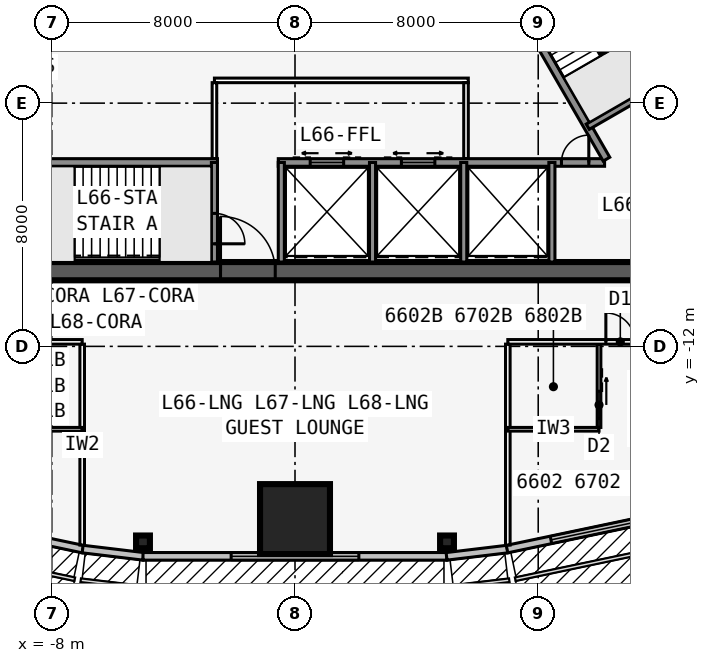
"""IFC4 building model, lengths in metres.
Left out: names, types, materials, properties, quantities, classifications, styles, units other than length and angle.
Written with IfcOpenShell. Run it as: python <this file> out.ifc"""

import sys

from ifc_helpers import new_model, si_unit, direction, frame, frame_2d, origin, origin_2d, place, context, subcontext, project, spatial, rectangle, i_section, extrude, element, fill, save


model = new_model("IFC4")
c1 = context("Model", 3, precision=1e-05, world=origin(), true_north=direction((0.0, 1.0)))
c2 = subcontext(c1, "Body", "Model", "MODEL_VIEW")
j1 = project(units=[si_unit("LENGTHUNIT", "METRE"), si_unit("PLANEANGLEUNIT", "RADIAN")], contexts=[c1])
p1 = place(None, origin())
s1 = spatial("IfcSite", under=j1, at=p1, CompositionType="ELEMENT")
p2 = place(p1, origin())
s2 = spatial("IfcBuilding", under=s1, at=p2, CompositionType="ELEMENT")
p3 = place(p2, frame((0.0, 0.0, 250.1)))
s3 = spatial("IfcBuildingStorey", under=s2, at=p3, CompositionType="ELEMENT", Elevation=250.1)
p4 = place(p3, frame((-16.5, -9.526, 0.0), z_axis=(0.0, 0.0, 1.0), x_axis=(1.0, 0.0, 0.0)))
e1 = element("IfcWall", 1, at=p4, inside=s3, PredefinedType="SHEAR", context=c2, shape_type="SweptSolid", body=[
    extrude(rectangle(XDim=33.0, YDim=0.6, at=frame_2d((16.5, 0.0))), origin(), (0.0, 0.0, 1.0), 3.6),
])
p5 = place(p4, frame((14.05, 0.0, 0.0)))
e2 = element("IfcOpeningElement", 2, at=p5, cuts=e1, PredefinedType="OPENING", context=c2, shape_type="SweptSolid", body=[
    extrude(rectangle(XDim=1.8, YDim=2.13, at=frame_2d((0.9, 1.065))), frame((0.0, 0.31, 0.0), z_axis=(0.0, -1.0, 0.0), x_axis=(1.0, 0.0, 0.0)), (0.0, 0.0, 1.0), 0.62),
])
p6 = place(p3, frame((-10.183, -5.951, 0.0), z_axis=(0.0, 0.0, 1.0), x_axis=(1.0, 0.0, 0.0)))
e3 = element("IfcWall", 3, at=p6, inside=s3, PredefinedType="SOLIDWALL", context=c2, shape_type="SweptSolid", body=[
    extrude(rectangle(XDim=7.633, YDim=0.25, at=frame_2d((3.816, 0.0))), origin(), (0.0, 0.0, 1.0), 3.435),
])
p7 = place(p3, frame((-0.55, -5.951, 0.0), z_axis=(0.0, 0.0, 1.0), x_axis=(1.0, 0.0, 0.0)))
e4 = element("IfcWall", 4, at=p7, inside=s3, PredefinedType="SOLIDWALL", context=c2, shape_type="SweptSolid", body=[
    extrude(rectangle(XDim=10.733, YDim=0.25, at=frame_2d((5.366, 0.0))), origin(), (0.0, 0.0, 1.0), 3.435),
])
p8 = place(p7, frame((9.314, 0.0, 0.0)))
e5 = element("IfcOpeningElement", 5, at=p8, cuts=e4, PredefinedType="OPENING", context=c2, shape_type="SweptSolid", body=[
    extrude(rectangle(XDim=0.9, YDim=2.13, at=frame_2d((0.45, 1.065))), frame((0.0, 0.135, 0.0), z_axis=(0.0, -1.0, 0.0), x_axis=(1.0, 0.0, 0.0)), (0.0, 0.0, 1.0), 0.27),
])
p9 = place(p7, frame((1.05, 0.0, 0.0)))
e6 = element("IfcOpeningElement", 6, at=p9, cuts=e4, PredefinedType="OPENING", context=c2, shape_type="SweptSolid", body=[
    extrude(rectangle(XDim=1.1, YDim=2.13, at=frame_2d((0.55, 1.065))), frame((0.0, 0.135, 0.0), z_axis=(0.0, -1.0, 0.0), x_axis=(1.0, 0.0, 0.0)), (0.0, 0.0, 1.0), 0.27),
])
p10 = place(p7, frame((4.05, 0.0, 0.0)))
e7 = element("IfcOpeningElement", 7, at=p10, cuts=e4, PredefinedType="OPENING", context=c2, shape_type="SweptSolid", body=[
    extrude(rectangle(XDim=1.1, YDim=2.13, at=frame_2d((0.55, 1.065))), frame((0.0, 0.135, 0.0), z_axis=(0.0, -1.0, 0.0), x_axis=(1.0, 0.0, 0.0)), (0.0, 0.0, 1.0), 0.27),
])
p11 = place(p3, frame((-2.65, -5.951, 0.0), z_axis=(0.0, 0.0, 1.0), x_axis=(0.0, -1.0, 0.0)))
e8 = element("IfcWall", 8, at=p11, inside=s3, PredefinedType="SOLIDWALL", context=c2, shape_type="SweptSolid", body=[
    extrude(rectangle(XDim=3.275, YDim=0.2, at=frame_2d((1.637, 0.0))), origin(), (0.0, 0.0, 1.0), 3.435),
])
p12 = place(p11, frame((1.675, 0.0, 0.0)))
e9 = element("IfcOpeningElement", 9, at=p12, cuts=e8, PredefinedType="OPENING", context=c2, shape_type="SweptSolid", body=[
    extrude(rectangle(XDim=1.0, YDim=2.13, at=frame_2d((0.5, 1.065))), frame((0.0, 0.11, 0.0), z_axis=(0.0, -1.0, 0.0), x_axis=(1.0, 0.0, 0.0)), (0.0, 0.0, 1.0), 0.22),
])
for number, where, z_axis, x_axis in (
    (10, (-0.45, -5.951, 0.0), (0.0, 0.0, 1.0), (0.0, -1.0, 0.0)),
    (11, (2.55, -5.951, 0.0), (0.0, 0.0, 1.0), (0.0, -1.0, 0.0)),
    (12, (5.55, -5.951, 0.0), (0.0, 0.0, 1.0), (0.0, -1.0, 0.0)),
    (13, (8.45, -5.951, 0.0), (0.0, 0.0, 1.0), (0.0, -1.0, 0.0)),
):
    element("IfcWall", number, at=place(p3, frame(where, z_axis=z_axis, x_axis=x_axis)), inside=s3, PredefinedType="SOLIDWALL", context=c2, shape_type="SweptSolid", body=[
        extrude(rectangle(XDim=3.275, YDim=0.2, at=frame_2d((1.637, 0.0))), origin(), (0.0, 0.0, 1.0), 3.435),
    ])
p13 = place(p3, frame((16.5, -9.526, 0.0), z_axis=(0.0, 0.0, 1.0), x_axis=(-0.499999749417, 0.866025548458, 0.0)))
e14 = element("IfcWall", 14, at=p13, inside=s3, PredefinedType="SHEAR", context=c2, shape_type="SweptSolid", body=[
    extrude(rectangle(XDim=33.0, YDim=0.6, at=frame_2d((16.5, 0.0))), origin(), (0.0, 0.0, 1.0), 3.6),
])
p14 = place(p13, frame((14.15, 0.0, 0.0)))
e15 = element("IfcOpeningElement", 15, at=p14, cuts=e14, PredefinedType="OPENING", context=c2, shape_type="SweptSolid", body=[
    extrude(rectangle(XDim=1.8, YDim=2.13, at=frame_2d((0.9, 1.065))), frame((0.0, 0.31, 0.0), z_axis=(0.0, -1.0, 0.0), x_axis=(1.0, 0.0, 0.0)), (0.0, 0.0, 1.0), 0.62),
])
p15 = place(p13, frame((12.6, 0.0, 0.0)))
e16 = element("IfcOpeningElement", 16, at=p15, cuts=e14, PredefinedType="OPENING", context=c2, shape_type="SweptSolid", body=[
    extrude(rectangle(XDim=1.0, YDim=2.13, at=frame_2d((0.5, 1.065))), frame((0.0, 0.31, 0.0), z_axis=(0.0, -1.0, 0.0), x_axis=(1.0, 0.0, 0.0)), (0.0, 0.0, 1.0), 0.62),
])
p16 = place(p3, frame((10.245, -5.843, 0.0), z_axis=(0.0, 0.0, 1.0), x_axis=(-0.499993009313, 0.866029439822, 0.0)))
e17 = element("IfcWall", 17, at=p16, inside=s3, PredefinedType="SOLIDWALL", context=c2, shape_type="SweptSolid", body=[
    extrude(rectangle(XDim=7.733, YDim=0.25, at=frame_2d((3.866, 0.0))), origin(), (0.0, 0.0, 1.0), 3.435),
])
p17 = place(p3, frame((9.629, -4.775, 0.0), z_axis=(0.0, 0.0, 1.0), x_axis=(0.865995643347, 0.500051543047, 0.0)))
e18 = element("IfcWall", 18, at=p17, inside=s3, PredefinedType="SOLIDWALL", context=c2, shape_type="SweptSolid", body=[
    extrude(rectangle(XDim=3.275, YDim=0.2, at=frame_2d((1.638, 0.0))), origin(), (0.0, 0.0, 1.0), 3.435),
])
p18 = place(p3, frame((0.0, 19.052, 0.0), z_axis=(0.0, 0.0, 1.0), x_axis=(-0.499999749417, -0.866025548458, 0.0)))
e19 = element("IfcWall", 19, at=p18, inside=s3, PredefinedType="SHEAR", context=c2, shape_type="SweptSolid", body=[
    extrude(rectangle(XDim=33.0, YDim=0.6, at=frame_2d((16.5, 0.0))), origin(), (0.0, 0.0, 1.0), 3.6),
])
p19 = place(p18, frame((14.15, 0.0, 0.0)))
e20 = element("IfcOpeningElement", 20, at=p19, cuts=e19, PredefinedType="OPENING", context=c2, shape_type="SweptSolid", body=[
    extrude(rectangle(XDim=1.8, YDim=2.13, at=frame_2d((0.9, 1.065))), frame((0.0, 0.31, 0.0), z_axis=(0.0, -1.0, 0.0), x_axis=(1.0, 0.0, 0.0)), (0.0, 0.0, 1.0), 0.62),
])
p20 = place(p18, frame((12.6, 0.0, 0.0)))
e21 = element("IfcOpeningElement", 21, at=p20, cuts=e19, PredefinedType="OPENING", context=c2, shape_type="SweptSolid", body=[
    extrude(rectangle(XDim=1.0, YDim=2.13, at=frame_2d((0.5, 1.065))), frame((0.0, 0.31, 0.0), z_axis=(0.0, -1.0, 0.0), x_axis=(1.0, 0.0, 0.0)), (0.0, 0.0, 1.0), 0.62),
])
p21 = place(p3, frame((-4.929, 3.365, 0.0), z_axis=(0.0, 0.0, 1.0), x_axis=(-0.499991433582, -0.866030349552, 0.0)))
e22 = element("IfcWall", 22, at=p21, inside=s3, PredefinedType="SOLIDWALL", context=c2, shape_type="SweptSolid", body=[
    extrude(rectangle(XDim=10.633, YDim=0.25, at=frame_2d((5.316, 0.0))), origin(), (0.0, 0.0, 1.0), 3.435),
])
p22 = place(p21, frame((9.164, 0.0, 0.0)))
e23 = element("IfcOpeningElement", 23, at=p22, cuts=e22, PredefinedType="OPENING", context=c2, shape_type="SweptSolid", body=[
    extrude(rectangle(XDim=0.9, YDim=2.13, at=frame_2d((0.45, 1.065))), frame((0.0, 0.135, 0.0), z_axis=(0.0, -1.0, 0.0), x_axis=(1.0, 0.0, 0.0)), (0.0, 0.0, 1.0), 0.27),
])
p23 = place(p21, frame((1.1, 0.0, 0.0)))
e24 = element("IfcOpeningElement", 24, at=p23, cuts=e22, PredefinedType="OPENING", context=c2, shape_type="SweptSolid", body=[
    extrude(rectangle(XDim=0.9, YDim=2.13, at=frame_2d((0.45, 1.065))), frame((0.0, 0.135, 0.0), z_axis=(0.0, -1.0, 0.0), x_axis=(1.0, 0.0, 0.0)), (0.0, 0.0, 1.0), 0.27),
])
p24 = place(p21, frame((4.0, 0.0, 0.0)))
e25 = element("IfcOpeningElement", 25, at=p24, cuts=e22, PredefinedType="OPENING", context=c2, shape_type="SweptSolid", body=[
    extrude(rectangle(XDim=0.9, YDim=2.13, at=frame_2d((0.45, 1.065))), frame((0.0, 0.135, 0.0), z_axis=(0.0, -1.0, 0.0), x_axis=(1.0, 0.0, 0.0)), (0.0, 0.0, 1.0), 0.27),
])
for number, where, z_axis, x_axis in (
    (26, (-5.0, -18.43, 0.0), (0.0, 0.0, 1.0), (0.0, -1.0, 0.0)),
    (27, (5.0, -18.43, 0.0), (0.0, 0.0, 1.0), (0.0, -1.0, 0.0)),
):
    element("IfcColumn", number, at=place(p3, frame(where, z_axis=z_axis, x_axis=x_axis)), inside=s3, PredefinedType="COLUMN", context=c2, shape_type="SweptSolid", body=[
        extrude(i_section(OverallWidth=0.419, OverallDepth=0.455, WebThickness=0.042, FlangeThickness=0.068, at=origin_2d()), origin(), (0.0, 0.0, 1.0), 3.6),
    ])
p25 = place(p3, frame((0.0, -17.68, 0.0), z_axis=(0.0, 0.0, 1.0), x_axis=(0.0, -1.0, 0.0)))
e28 = element("IfcColumn", 28, at=p25, inside=s3, PredefinedType="COLUMN", context=c2, shape_type="SweptSolid", body=[
    extrude(rectangle(XDim=2.3, YDim=2.3, at=origin_2d()), origin(), (0.0, 0.0, 1.0), 3.6),
])
p26 = place(p3, frame((-13.974, -17.198, 0.0), z_axis=(0.0, 0.0, 1.0), x_axis=(0.978654320409, -0.205513311355, 0.0)))
e29 = element("IfcWall", 29, at=p26, inside=s3, PredefinedType="STANDARD", context=c2, shape_type="SweptSolid", body=[
    extrude(rectangle(XDim=7.153, YDim=0.25, at=frame_2d((3.576, 0.0))), origin(), (0.0, 0.0, 1.0), 3.435),
])
p27 = place(p26, frame((1.476, 0.0, 0.45)))
e30 = element("IfcOpeningElement", 30, at=p27, cuts=e29, PredefinedType="OPENING", context=c2, shape_type="SweptSolid", body=[
    extrude(rectangle(XDim=4.2, YDim=2.6, at=frame_2d((2.1, 1.3))), frame((0.0, 0.135, 0.0), z_axis=(0.0, -1.0, 0.0), x_axis=(1.0, 0.0, 0.0)), (0.0, 0.0, 1.0), 0.27),
])
p28 = place(p3, frame((-6.985, -18.667, 0.0), z_axis=(0.0, 0.0, 1.0), x_axis=(0.992877411981, -0.119140441403, 0.0)))
e31 = element("IfcWall", 31, at=p28, inside=s3, PredefinedType="STANDARD", context=c2, shape_type="SweptSolid", body=[
    extrude(rectangle(XDim=2.014, YDim=0.25, at=frame_2d((1.007, 0.0))), origin(), (0.0, 0.0, 1.0), 3.435),
])
p29 = place(p3, frame((-5.0, -18.906, 0.0), z_axis=(0.0, 0.0, 1.0), x_axis=(1.0, 0.0, 0.0)))
e32 = element("IfcWall", 32, at=p29, inside=s3, PredefinedType="STANDARD", context=c2, shape_type="SweptSolid", body=[
    extrude(rectangle(XDim=10.0, YDim=0.25, at=frame_2d((5.0, 0.0))), origin(), (0.0, 0.0, 1.0), 3.435),
])
p30 = place(p29, frame((2.9, 0.0, 0.45)))
e33 = element("IfcOpeningElement", 33, at=p30, cuts=e32, PredefinedType="OPENING", context=c2, shape_type="SweptSolid", body=[
    extrude(rectangle(XDim=4.2, YDim=2.6, at=frame_2d((2.1, 1.3))), frame((0.0, 0.135, 0.0), z_axis=(0.0, -1.0, 0.0), x_axis=(1.0, 0.0, 0.0)), (0.0, 0.0, 1.0), 0.27),
])
p31 = place(p3, frame((4.985, -18.906, 0.0), z_axis=(0.0, 0.0, 1.0), x_axis=(0.992877411981, 0.119140441403, 0.0)))
e34 = element("IfcWall", 34, at=p31, inside=s3, PredefinedType="STANDARD", context=c2, shape_type="SweptSolid", body=[
    extrude(rectangle(XDim=2.014, YDim=0.25, at=frame_2d((1.007, 0.0))), origin(), (0.0, 0.0, 1.0), 3.435),
])
p32 = place(p3, frame((6.974, -18.668, 0.0), z_axis=(0.0, 0.0, 1.0), x_axis=(0.978654320409, 0.205513311355, 0.0)))
e35 = element("IfcWall", 35, at=p32, inside=s3, PredefinedType="STANDARD", context=c2, shape_type="SweptSolid", body=[
    extrude(rectangle(XDim=7.153, YDim=0.25, at=frame_2d((3.576, 0.0))), origin(), (0.0, 0.0, 1.0), 3.435),
])
p33 = place(p32, frame((1.476, 0.0, 0.45)))
e36 = element("IfcOpeningElement", 36, at=p33, cuts=e35, PredefinedType="OPENING", context=c2, shape_type="SweptSolid", body=[
    extrude(rectangle(XDim=4.2, YDim=2.6, at=frame_2d((2.1, 1.3))), frame((0.0, 0.135, 0.0), z_axis=(0.0, -1.0, 0.0), x_axis=(1.0, 0.0, 0.0)), (0.0, 0.0, 1.0), 0.27),
])
p34 = place(p3, frame((-19.827, -11.851, 0.0), z_axis=(0.0, 0.0, 1.0), x_axis=(1.0, 0.0, 0.0)))
e37 = element("IfcWall", 37, at=p34, inside=s3, PredefinedType="PARTITIONING", context=c2, shape_type="SweptSolid", body=[
    extrude(rectangle(XDim=12.827, YDim=0.15, at=frame_2d((6.414, 0.0))), origin(), (0.0, 0.0, 1.0), 3.435),
])
p35 = place(p34, frame((8.652, 0.0, 0.0)))
e38 = element("IfcOpeningElement", 38, at=p35, cuts=e37, PredefinedType="OPENING", context=c2, shape_type="SweptSolid", body=[
    extrude(rectangle(XDim=0.95, YDim=2.13, at=frame_2d((0.475, 1.065))), frame((0.0, 0.085, 0.0), z_axis=(0.0, -1.0, 0.0), x_axis=(1.0, 0.0, 0.0)), (0.0, 0.0, 1.0), 0.17),
])
p36 = place(p3, frame((7.0, -11.851, 0.0), z_axis=(0.0, 0.0, 1.0), x_axis=(1.0, 0.0, 0.0)))
e39 = element("IfcWall", 39, at=p36, inside=s3, PredefinedType="PARTITIONING", context=c2, shape_type="SweptSolid", body=[
    extrude(rectangle(XDim=12.827, YDim=0.15, at=frame_2d((6.414, 0.0))), origin(), (0.0, 0.0, 1.0), 3.435),
])
p37 = place(p36, frame((3.225, 0.0, 0.0)))
e40 = element("IfcOpeningElement", 40, at=p37, cuts=e39, PredefinedType="OPENING", context=c2, shape_type="SweptSolid", body=[
    extrude(rectangle(XDim=0.95, YDim=2.13, at=frame_2d((0.475, 1.065))), frame((0.0, 0.085, 0.0), z_axis=(0.0, -1.0, 0.0), x_axis=(1.0, 0.0, 0.0)), (0.0, 0.0, 1.0), 0.17),
])
for number, where, z_axis, x_axis in (
    (41, (-7.0, -11.926, 0.0), (0.0, 0.0, 1.0), (0.0, -1.0, 0.0)),
    (42, (7.0, -11.926, 0.0), (0.0, 0.0, 1.0), (0.0, -1.0, 0.0)),
):
    element("IfcWall", number, at=place(p3, frame(where, z_axis=z_axis, x_axis=x_axis)), inside=s3, PredefinedType="PARTITIONING", context=c2, shape_type="SweptSolid", body=[
        extrude(rectangle(XDim=6.609, YDim=0.15, at=frame_2d((3.304, 0.0))), origin(), (0.0, 0.0, 1.0), 2.678),
    ])
for number, where, z_axis, x_axis in (
    (43, (-10.0, -14.726, 0.0), (0.0, 0.0, 1.0), (1.0, 0.0, 0.0)),
    (44, (7.0, -14.726, 0.0), (0.0, 0.0, 1.0), (1.0, 0.0, 0.0)),
):
    element("IfcWall", number, at=place(p3, frame(where, z_axis=z_axis, x_axis=x_axis)), inside=s3, PredefinedType="PLUMBINGWALL", context=c2, shape_type="SweptSolid", body=[
        extrude(rectangle(XDim=3.0, YDim=0.12, at=frame_2d((1.5, 0.0))), origin(), (0.0, 0.0, 1.0), 3.435),
    ])
p38 = place(p3, frame((10.0, -11.926, 0.0), z_axis=(0.0, 0.0, 1.0), x_axis=(0.0, -1.0, 0.0)))
e45 = element("IfcWall", 45, at=p38, inside=s3, PredefinedType="PLUMBINGWALL", context=c2, shape_type="SweptSolid", body=[
    extrude(rectangle(XDim=2.74, YDim=0.12, at=frame_2d((1.37, 0.0))), origin(), (0.0, 0.0, 1.0), 3.435),
])
p39 = place(p38, frame((1.55, 0.0, 0.0)))
e46 = element("IfcOpeningElement", 46, at=p39, cuts=e45, PredefinedType="OPENING", context=c2, shape_type="SweptSolid", body=[
    extrude(rectangle(XDim=0.9, YDim=2.13, at=frame_2d((0.45, 1.065))), frame((0.0, 0.07, 0.0), z_axis=(0.0, -1.0, 0.0), x_axis=(1.0, 0.0, 0.0)), (0.0, 0.0, 1.0), 0.14),
])
p40 = place(p3, frame((20.177, -11.245, 0.0), z_axis=(0.0, 0.0, 1.0), x_axis=(-0.499998875317, 0.866026053119, 0.0)))
e47 = element("IfcWall", 47, at=p40, inside=s3, PredefinedType="PARTITIONING", context=c2, shape_type="SweptSolid", body=[
    extrude(rectangle(XDim=39.654, YDim=0.15, at=frame_2d((19.827, 0.0))), origin(), (0.0, 0.0, 1.0), 3.435),
])
p41 = place(p40, frame((5.772, 0.0, 0.0)))
e48 = element("IfcOpeningElement", 48, at=p41, cuts=e47, PredefinedType="OPENING", context=c2, shape_type="SweptSolid", body=[
    extrude(rectangle(XDim=0.95, YDim=2.13, at=frame_2d((0.475, 1.065))), frame((0.0, 0.085, 0.0), z_axis=(0.0, -1.0, 0.0), x_axis=(1.0, 0.0, 0.0)), (0.0, 0.0, 1.0), 0.17),
])
p42 = place(p40, frame((32.932, 0.0, 0.0)))
e49 = element("IfcOpeningElement", 49, at=p42, cuts=e47, PredefinedType="OPENING", context=c2, shape_type="SweptSolid", body=[
    extrude(rectangle(XDim=0.95, YDim=2.13, at=frame_2d((0.475, 1.065))), frame((0.0, 0.085, 0.0), z_axis=(0.0, -1.0, 0.0), x_axis=(1.0, 0.0, 0.0)), (0.0, 0.0, 1.0), 0.17),
])
p43 = place(p3, frame((-0.35, 23.096, 0.0), z_axis=(0.0, 0.0, 1.0), x_axis=(-0.499998875317, -0.866026053119, 0.0)))
e50 = element("IfcWall", 50, at=p43, inside=s3, PredefinedType="PARTITIONING", context=c2, shape_type="SweptSolid", body=[
    extrude(rectangle(XDim=39.654, YDim=0.15, at=frame_2d((19.827, 0.0))), origin(), (0.0, 0.0, 1.0), 3.435),
])
p44 = place(p43, frame((8.652, 0.0, 0.0)))
e51 = element("IfcOpeningElement", 51, at=p44, cuts=e50, PredefinedType="OPENING", context=c2, shape_type="SweptSolid", body=[
    extrude(rectangle(XDim=0.95, YDim=2.13, at=frame_2d((0.475, 1.065))), frame((0.0, 0.085, 0.0), z_axis=(0.0, -1.0, 0.0), x_axis=(1.0, 0.0, 0.0)), (0.0, 0.0, 1.0), 0.17),
])
p45 = place(p43, frame((15.852, 0.0, 0.0)))
e52 = element("IfcOpeningElement", 52, at=p45, cuts=e50, PredefinedType="OPENING", context=c2, shape_type="SweptSolid", body=[
    extrude(rectangle(XDim=0.95, YDim=2.13, at=frame_2d((0.475, 1.065))), frame((0.0, 0.085, 0.0), z_axis=(0.0, -1.0, 0.0), x_axis=(1.0, 0.0, 0.0)), (0.0, 0.0, 1.0), 0.17),
])
p46 = place(p43, frame((30.052, 0.0, 0.0)))
e53 = element("IfcOpeningElement", 53, at=p46, cuts=e50, PredefinedType="OPENING", context=c2, shape_type="SweptSolid", body=[
    extrude(rectangle(XDim=0.95, YDim=2.13, at=frame_2d((0.475, 1.065))), frame((0.0, 0.085, 0.0), z_axis=(0.0, -1.0, 0.0), x_axis=(1.0, 0.0, 0.0)), (0.0, 0.0, 1.0), 0.17),
])
p47 = place(p3, frame((-2.65, -3.251, 0.0), z_axis=(0.0, 0.0, 1.0), x_axis=(1.0, 0.0, 0.0)))
e54 = element("IfcWall", 54, at=p47, inside=s3, PredefinedType="PARTITIONING", context=c2, shape_type="SweptSolid", body=[
    extrude(rectangle(XDim=8.35, YDim=0.15, at=frame_2d((4.175, 0.0))), origin(), (0.0, 0.0, 1.0), 3.435),
])
for number, where, z_axis, x_axis in (
    (55, (-2.65, -5.826, 0.0), (0.0, 0.0, 1.0), (0.0, 1.0, 0.0)),
    (56, (5.625, -5.826, 0.0), (0.0, 0.0, 1.0), (0.0, 1.0, 0.0)),
):
    element("IfcWall", number, at=place(p3, frame(where, z_axis=z_axis, x_axis=x_axis)), inside=s3, PredefinedType="PARTITIONING", context=c2, shape_type="SweptSolid", body=[
        extrude(rectangle(XDim=2.5, YDim=0.15, at=frame_2d((1.25, 0.0))), origin(), (0.0, 0.0, 1.0), 3.435),
    ])
p48 = place(p3, frame((-7.247, -7.576, 0.0), z_axis=(0.0, 0.0, 1.0), x_axis=(1.0, 0.0, 0.0)))
e57 = element("IfcWall", 57, at=p48, inside=s3, PredefinedType="SOLIDWALL", context=c2, shape_type="SweptSolid", body=[
    extrude(rectangle(XDim=2.794, YDim=0.1, at=frame_2d((1.397, 0.0))), origin(), (0.0, 0.0, 1.0), 3.6),
])
p49 = place(p3, frame((10.135, -2.401, 0.0), z_axis=(0.0, 0.0, 1.0), x_axis=(-0.499992232847, 0.866029888106, 0.0)))
e58 = element("IfcWall", 58, at=p49, inside=s3, PredefinedType="SOLIDWALL", context=c2, shape_type="SweptSolid", body=[
    extrude(rectangle(XDim=2.794, YDim=0.1, at=frame_2d((1.397, 0.0))), origin(), (0.0, 0.0, 1.0), 3.6),
])
p50 = place(p30, origin())
e59 = element("IfcWindow", 59, at=p50, inside=s3, PartitioningType="SINGLE_PANEL", PredefinedType="WINDOW", context=c2, shape_type="SweptSolid", body=[
    extrude(rectangle(XDim=4.2, YDim=2.6, at=frame_2d((2.1, 1.3))), frame((0.0, 0.03, 0.0), z_axis=(0.0, -1.0, 0.0), x_axis=(1.0, 0.0, 0.0)), (0.0, 0.0, 1.0), 0.06),
])
fill(e33, e59)
p51 = place(p33, origin())
e60 = element("IfcWindow", 60, at=p51, inside=s3, PartitioningType="SINGLE_PANEL", PredefinedType="WINDOW", context=c2, shape_type="SweptSolid", body=[
    extrude(rectangle(XDim=4.2, YDim=2.6, at=frame_2d((2.1, 1.3))), frame((0.0, 0.03, 0.0), z_axis=(0.0, -1.0, 0.0), x_axis=(1.0, 0.0, 0.0)), (0.0, 0.0, 1.0), 0.06),
])
fill(e36, e60)
p52 = place(p39, origin())
e61 = element("IfcDoor", 61, at=p52, inside=s3, OperationType="SLIDING_TO_LEFT", PredefinedType="DOOR", context=c2, shape_type="SweptSolid", body=[
    extrude(rectangle(XDim=0.9, YDim=2.13, at=frame_2d((0.45, 1.065))), frame((0.0, 0.025, 0.0), z_axis=(0.0, -1.0, 0.0), x_axis=(1.0, 0.0, 0.0)), (0.0, 0.0, 1.0), 0.05),
])
fill(e46, e61)
p53 = place(p37, origin())
e62 = element("IfcDoor", 62, at=p53, inside=s3, OperationType="SINGLE_SWING_LEFT", PredefinedType="DOOR", context=c2, shape_type="SweptSolid", body=[
    extrude(rectangle(XDim=0.95, YDim=2.13, at=frame_2d((0.475, 1.065))), frame((0.0, 0.025, 0.0), z_axis=(0.0, -1.0, 0.0), x_axis=(1.0, 0.0, 0.0)), (0.0, 0.0, 1.0), 0.05),
])
fill(e40, e62)
p54 = place(p5, origin())
e63 = element("IfcDoor", 63, at=p54, inside=s3, OperationType="DOUBLE_DOOR_SINGLE_SWING", PredefinedType="DOOR", context=c2, shape_type="SweptSolid", body=[
    extrude(rectangle(XDim=1.8, YDim=2.13, at=frame_2d((0.9, 1.065))), frame((0.0, 0.025, 0.0), z_axis=(0.0, -1.0, 0.0), x_axis=(1.0, 0.0, 0.0)), (0.0, 0.0, 1.0), 0.05),
])
fill(e2, e63)
p55 = place(p12, origin())
e64 = element("IfcDoor", 64, at=p55, inside=s3, OperationType="SINGLE_SWING_RIGHT", PredefinedType="DOOR", context=c2, shape_type="SweptSolid", body=[
    extrude(rectangle(XDim=1.0, YDim=2.13, at=frame_2d((0.5, 1.065))), frame((0.0, 0.025, 0.0), z_axis=(0.0, -1.0, 0.0), x_axis=(1.0, 0.0, 0.0)), (0.0, 0.0, 1.0), 0.05),
])
fill(e9, e64)
p56 = place(p8, origin())
e65 = element("IfcDoor", 65, at=p56, inside=s3, OperationType="SINGLE_SWING_RIGHT", PredefinedType="DOOR", context=c2, shape_type="SweptSolid", body=[
    extrude(rectangle(XDim=0.9, YDim=2.13, at=frame_2d((0.45, 1.065))), frame((0.0, 0.025, 0.0), z_axis=(0.0, -1.0, 0.0), x_axis=(1.0, 0.0, 0.0)), (0.0, 0.0, 1.0), 0.05),
])
fill(e5, e65)
p57 = place(p9, origin())
e66 = element("IfcDoor", 66, at=p57, inside=s3, OperationType="DOUBLE_DOOR_SLIDING", PredefinedType="USERDEFINED", context=c2, shape_type="SweptSolid", body=[
    extrude(rectangle(XDim=1.1, YDim=2.13, at=frame_2d((0.55, 1.065))), frame((0.0, 0.025, 0.0), z_axis=(0.0, -1.0, 0.0), x_axis=(1.0, 0.0, 0.0)), (0.0, 0.0, 1.0), 0.05),
])
fill(e6, e66)
p58 = place(p10, origin())
e67 = element("IfcDoor", 67, at=p58, inside=s3, OperationType="DOUBLE_DOOR_SLIDING", PredefinedType="USERDEFINED", context=c2, shape_type="SweptSolid", body=[
    extrude(rectangle(XDim=1.1, YDim=2.13, at=frame_2d((0.55, 1.065))), frame((0.0, 0.025, 0.0), z_axis=(0.0, -1.0, 0.0), x_axis=(1.0, 0.0, 0.0)), (0.0, 0.0, 1.0), 0.05),
])
fill(e7, e67)
save(model, sys.argv[1])
